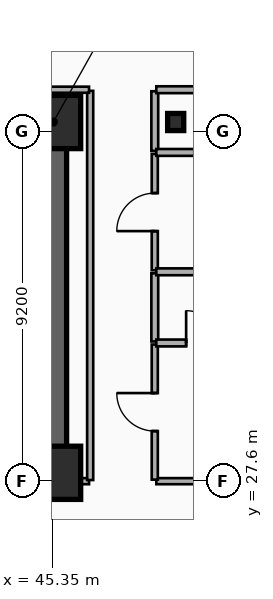
"""IFC4 building model, lengths in metres.
Left out: names, types, materials, properties, quantities, classifications, styles, units other than length and angle.
Written with IfcOpenShell. Run it as: python <this file> out.ifc"""

import sys

from ifc_helpers import new_model, si_unit, direction, frame, frame_2d, origin, origin_2d, place, context, subcontext, project, spatial, rectangle, i_section, extrude, element, fill, save


model = new_model("IFC4")
c1 = context("Model", 3, precision=1e-05, world=origin(), true_north=direction((0.0, 1.0)))
c2 = subcontext(c1, "Body", "Model", "MODEL_VIEW")
j1 = project(units=[si_unit("LENGTHUNIT", "METRE"), si_unit("PLANEANGLEUNIT", "RADIAN")], contexts=[c1])
p1 = place(None, origin())
s1 = spatial("IfcSite", under=j1, at=p1, CompositionType="ELEMENT")
p2 = place(p1, origin())
s2 = spatial("IfcBuilding", under=s1, at=p2, CompositionType="ELEMENT")
p3 = place(p2, frame((0.0, 0.0, 50.0)))
s3 = spatial("IfcBuildingStorey", under=s2, at=p3, CompositionType="ELEMENT", Elevation=50.0)
p4 = place(p3, frame((12.15, 37.05, 0.0), z_axis=(0.0, 0.0, 1.0), x_axis=(1.0, 0.0, 0.0)))
e1 = element("IfcWall", 1, at=p4, inside=s3, PredefinedType="SHEAR", context=c2, shape_type="SweptSolid", body=[
    extrude(rectangle(XDim=33.23, YDim=0.7, at=frame_2d((16.615, 0.0))), origin(), (0.0, 0.0, 1.0), 3.5),
])
p5 = place(p3, frame((45.38, 27.82, 0.0), z_axis=(0.0, 0.0, 1.0), x_axis=(-1.0, 0.0, 0.0)))
e2 = element("IfcWall", 2, at=p5, inside=s3, PredefinedType="SHEAR", context=c2, shape_type="SweptSolid", body=[
    extrude(rectangle(XDim=12.23, YDim=0.7, at=frame_2d((6.115, 0.0))), origin(), (0.0, 0.0, 1.0), 3.5),
])
p6 = place(p5, frame((9.93, 0.0, 0.0)))
e3 = element("IfcOpeningElement", 3, at=p6, cuts=e2, PredefinedType="OPENING", context=c2, shape_type="SweptSolid", body=[
    extrude(rectangle(XDim=1.1, YDim=2.15, at=frame_2d((0.55, 1.075))), frame((0.0, 0.36, 0.0), z_axis=(0.0, -1.0, 0.0), x_axis=(1.0, 0.0, 0.0)), (0.0, 0.0, 1.0), 0.72),
])
p7 = place(p5, frame((6.23, 0.0, 0.0)))
e4 = element("IfcOpeningElement", 4, at=p7, cuts=e2, PredefinedType="OPENING", context=c2, shape_type="SweptSolid", body=[
    extrude(rectangle(XDim=1.1, YDim=2.15, at=frame_2d((0.55, 1.075))), frame((0.0, 0.36, 0.0), z_axis=(0.0, -1.0, 0.0), x_axis=(1.0, 0.0, 0.0)), (0.0, 0.0, 1.0), 0.72),
])
p8 = place(p3, frame((45.38, 28.17, 0.0), z_axis=(0.0, 0.0, 1.0), x_axis=(0.0, 1.0, 0.0)))
e5 = element("IfcWall", 5, at=p8, inside=s3, PredefinedType="SHEAR", context=c2, shape_type="SweptSolid", body=[
    extrude(rectangle(XDim=8.53, YDim=0.7, at=frame_2d((4.265, 0.0))), origin(), (0.0, 0.0, 1.0), 3.5),
])
for number, where, z_axis, x_axis in (
    (6, (45.4, 27.82, 0.0), (0.0, 0.0, 1.0), (1.0, 0.0, 0.0)),
    (7, (45.4, 37.05, 0.0), (0.0, 0.0, 1.0), (1.0, 0.0, 0.0)),
):
    element("IfcColumn", number, at=place(p3, frame(where, z_axis=z_axis, x_axis=x_axis)), inside=s3, PredefinedType="COLUMN", context=c2, shape_type="SweptSolid", body=[
        extrude(rectangle(XDim=1.4, YDim=1.4, at=origin_2d()), origin(), (0.0, 0.0, 1.0), 3.5),
    ])
p9 = place(p3, frame((48.6, 37.05, 0.0), z_axis=(0.0, 0.0, 1.0), x_axis=(1.0, 0.0, 0.0)))
e8 = element("IfcColumn", 8, at=p9, inside=s3, PredefinedType="COLUMN", context=c2, shape_type="SweptSolid", body=[
    extrude(i_section(OverallWidth=0.424, OverallDepth=0.45, WebThickness=0.041, FlangeThickness=0.065, FilletRadius=0.015, at=origin_2d()), origin(), (0.0, 0.0, 1.0), 3.5),
])
p10 = place(p3, frame((48.09, 27.6, 0.0), z_axis=(0.0, 0.0, 1.0), x_axis=(1.0, 0.0, 0.0)))
e9 = element("IfcWall", 9, at=p10, inside=s3, PredefinedType="PARTITIONING", context=c2, shape_type="SweptSolid", body=[
    extrude(rectangle(XDim=9.25, YDim=0.16, at=frame_2d((4.625, 0.0))), origin(), (0.0, 0.0, 1.0), 2.57),
])
p11 = place(p10, frame((4.125, 0.0, 0.0)))
e10 = element("IfcOpeningElement", 10, at=p11, cuts=e9, PredefinedType="OPENING", context=c2, shape_type="SweptSolid", body=[
    extrude(rectangle(XDim=1.0, YDim=2.15, at=frame_2d((0.5, 1.075))), frame((0.0, 0.09, 0.0), z_axis=(0.0, -1.0, 0.0), x_axis=(1.0, 0.0, 0.0)), (0.0, 0.0, 1.0), 0.18),
])
p12 = place(p3, frame((48.05, 27.64, 0.0), z_axis=(0.0, 0.0, 1.0), x_axis=(0.0, 1.0, 0.0)))
e11 = element("IfcWall", 11, at=p12, inside=s3, PredefinedType="PARTITIONING", context=c2, shape_type="SweptSolid", body=[
    extrude(rectangle(XDim=3.556, YDim=0.16, at=frame_2d((1.778, 0.0))), origin(), (0.0, 0.0, 1.0), 3.24),
])
p13 = place(p12, frame((1.278, 0.0, 0.0)))
e12 = element("IfcOpeningElement", 12, at=p13, cuts=e11, PredefinedType="OPENING", context=c2, shape_type="SweptSolid", body=[
    extrude(rectangle(XDim=1.0, YDim=2.15, at=frame_2d((0.5, 1.075))), frame((0.0, 0.09, 0.0), z_axis=(0.0, -1.0, 0.0), x_axis=(1.0, 0.0, 0.0)), (0.0, 0.0, 1.0), 0.18),
])
p14 = place(p3, frame((48.05, 31.276, 0.0), z_axis=(0.0, 0.0, 1.0), x_axis=(0.0, 1.0, 0.0)))
e13 = element("IfcWall", 13, at=p14, inside=s3, PredefinedType="PLUMBINGWALL", context=c2, shape_type="SweptSolid", body=[
    extrude(rectangle(XDim=1.793, YDim=0.18, at=frame_2d((0.896, 0.0))), origin(), (0.0, 0.0, 1.0), 3.24),
])
p15 = place(p3, frame((48.05, 33.149, 0.0), z_axis=(0.0, 0.0, 1.0), x_axis=(0.0, 1.0, 0.0)))
e14 = element("IfcWall", 14, at=p15, inside=s3, PredefinedType="PARTITIONING", context=c2, shape_type="SweptSolid", body=[
    extrude(rectangle(XDim=3.061, YDim=0.16, at=frame_2d((1.531, 0.0))), origin(), (0.0, 0.0, 1.0), 3.24),
])
p16 = place(p15, frame((1.031, 0.0, 0.0)))
e15 = element("IfcOpeningElement", 15, at=p16, cuts=e14, PredefinedType="OPENING", context=c2, shape_type="SweptSolid", body=[
    extrude(rectangle(XDim=1.0, YDim=2.15, at=frame_2d((0.5, 1.075))), frame((0.0, 0.09, 0.0), z_axis=(0.0, -1.0, 0.0), x_axis=(1.0, 0.0, 0.0)), (0.0, 0.0, 1.0), 0.18),
])
p17 = place(p3, frame((48.05, 36.29, 0.0), z_axis=(0.0, 0.0, 1.0), x_axis=(0.0, 1.0, 0.0)))
e16 = element("IfcWall", 16, at=p17, inside=s3, PredefinedType="PLUMBINGWALL", context=c2, shape_type="SweptSolid", body=[
    extrude(rectangle(XDim=1.57, YDim=0.18, at=frame_2d((0.785, 0.0))), origin(), (0.0, 0.0, 1.0), 2.72),
])
p18 = place(p3, frame((48.09, 37.9, 0.0), z_axis=(0.0, 0.0, 1.0), x_axis=(1.0, 0.0, 0.0)))
e17 = element("IfcWall", 17, at=p18, inside=s3, PredefinedType="PLUMBINGWALL", context=c2, shape_type="SweptSolid", body=[
    extrude(rectangle(XDim=2.42, YDim=0.18, at=frame_2d((1.21, 0.0))), origin(), (0.0, 0.0, 1.0), 3.24),
])
p19 = place(p3, frame((48.09, 31.236, 0.0), z_axis=(0.0, 0.0, 1.0), x_axis=(1.0, 0.0, 0.0)))
e18 = element("IfcWall", 18, at=p19, inside=s3, PredefinedType="PLUMBINGWALL", context=c2, shape_type="SweptSolid", body=[
    extrude(rectangle(XDim=2.42, YDim=0.18, at=frame_2d((1.21, 0.0))), origin(), (0.0, 0.0, 1.0), 2.57),
])
p20 = place(p19, frame((0.785, 0.0, 0.0)))
e19 = element("IfcOpeningElement", 19, at=p20, cuts=e18, PredefinedType="OPENING", context=c2, shape_type="SweptSolid", body=[
    extrude(rectangle(XDim=0.85, YDim=2.1, at=frame_2d((0.425, 1.05))), frame((0.0, 0.1, 0.0), z_axis=(0.0, -1.0, 0.0), x_axis=(1.0, 0.0, 0.0)), (0.0, 0.0, 1.0), 0.2),
])
p21 = place(p3, frame((48.09, 33.109, 0.0), z_axis=(0.0, 0.0, 1.0), x_axis=(1.0, 0.0, 0.0)))
e20 = element("IfcWall", 20, at=p21, inside=s3, PredefinedType="PLUMBINGWALL", context=c2, shape_type="SweptSolid", body=[
    extrude(rectangle(XDim=2.42, YDim=0.18, at=frame_2d((1.21, 0.0))), origin(), (0.0, 0.0, 1.0), 2.57),
])
p22 = place(p3, frame((50.51, 36.25, 0.0), z_axis=(0.0, 0.0, 1.0), x_axis=(-1.0, 0.0, 0.0)))
e21 = element("IfcWall", 21, at=p22, inside=s3, PredefinedType="PLUMBINGWALL", context=c2, shape_type="SweptSolid", body=[
    extrude(rectangle(XDim=2.42, YDim=0.18, at=frame_2d((1.21, 0.0))), origin(), (0.0, 0.0, 1.0), 2.57),
])
p23 = place(p22, frame((0.57, 0.0, 0.0)))
e22 = element("IfcOpeningElement", 22, at=p23, cuts=e21, PredefinedType="OPENING", context=c2, shape_type="SweptSolid", body=[
    extrude(rectangle(XDim=0.85, YDim=2.1, at=frame_2d((0.425, 1.05))), frame((0.0, 0.1, 0.0), z_axis=(0.0, -1.0, 0.0), x_axis=(1.0, 0.0, 0.0)), (0.0, 0.0, 1.0), 0.2),
])
p24 = place(p3, frame((45.41, 27.6, 0.0), z_axis=(0.0, 0.0, 1.0), x_axis=(1.0, 0.0, 0.0)))
e23 = element("IfcWall", 23, at=p24, inside=s3, PredefinedType="PARTITIONING", context=c2, shape_type="SweptSolid", body=[
    extrude(rectangle(XDim=0.91, YDim=0.16, at=frame_2d((0.455, 0.0))), origin(), (0.0, 0.0, 1.0), 2.28),
])
p25 = place(p3, frame((46.35, 27.63, 0.0), z_axis=(0.0, 0.0, 1.0), x_axis=(0.0, 1.0, 0.0)))
e24 = element("IfcWall", 24, at=p25, inside=s3, PredefinedType="PARTITIONING", context=c2, shape_type="SweptSolid", body=[
    extrude(rectangle(XDim=10.24, YDim=0.16, at=frame_2d((5.12, 0.0))), origin(), (0.0, 0.0, 1.0), 2.72),
])
p26 = place(p3, frame((11.28, 37.9, 0.0), z_axis=(0.0, 0.0, 1.0), x_axis=(1.0, 0.0, 0.0)))
e25 = element("IfcWall", 25, at=p26, inside=s3, PredefinedType="PARTITIONING", context=c2, shape_type="SweptSolid", body=[
    extrude(rectangle(XDim=35.04, YDim=0.16, at=frame_2d((17.52, 0.0))), origin(), (0.0, 0.0, 1.0), 3.24),
])
p27 = place(p13, origin())
e26 = element("IfcDoor", 26, at=p27, inside=s3, OperationType="SINGLE_SWING_RIGHT", PredefinedType="DOOR", context=c2, shape_type="SweptSolid", body=[
    extrude(rectangle(XDim=1.0, YDim=2.15, at=frame_2d((0.5, 1.075))), frame((0.0, 0.025, 0.0), z_axis=(0.0, -1.0, 0.0), x_axis=(1.0, 0.0, 0.0)), (0.0, 0.0, 1.0), 0.05),
])
fill(e12, e26)
p28 = place(p16, origin())
e27 = element("IfcDoor", 27, at=p28, inside=s3, OperationType="SINGLE_SWING_LEFT", PredefinedType="DOOR", context=c2, shape_type="SweptSolid", body=[
    extrude(rectangle(XDim=1.0, YDim=2.15, at=frame_2d((0.5, 1.075))), frame((0.0, 0.025, 0.0), z_axis=(0.0, -1.0, 0.0), x_axis=(1.0, 0.0, 0.0)), (0.0, 0.0, 1.0), 0.05),
])
fill(e15, e27)
p29 = place(p20, origin())
e28 = element("IfcDoor", 28, at=p29, inside=s3, OperationType="SINGLE_SWING_LEFT", PredefinedType="DOOR", context=c2, shape_type="SweptSolid", body=[
    extrude(rectangle(XDim=0.85, YDim=2.1, at=frame_2d((0.425, 1.05))), frame((0.0, 0.025, 0.0), z_axis=(0.0, -1.0, 0.0), x_axis=(1.0, 0.0, 0.0)), (0.0, 0.0, 1.0), 0.05),
])
fill(e19, e28)
save(model, sys.argv[1])
